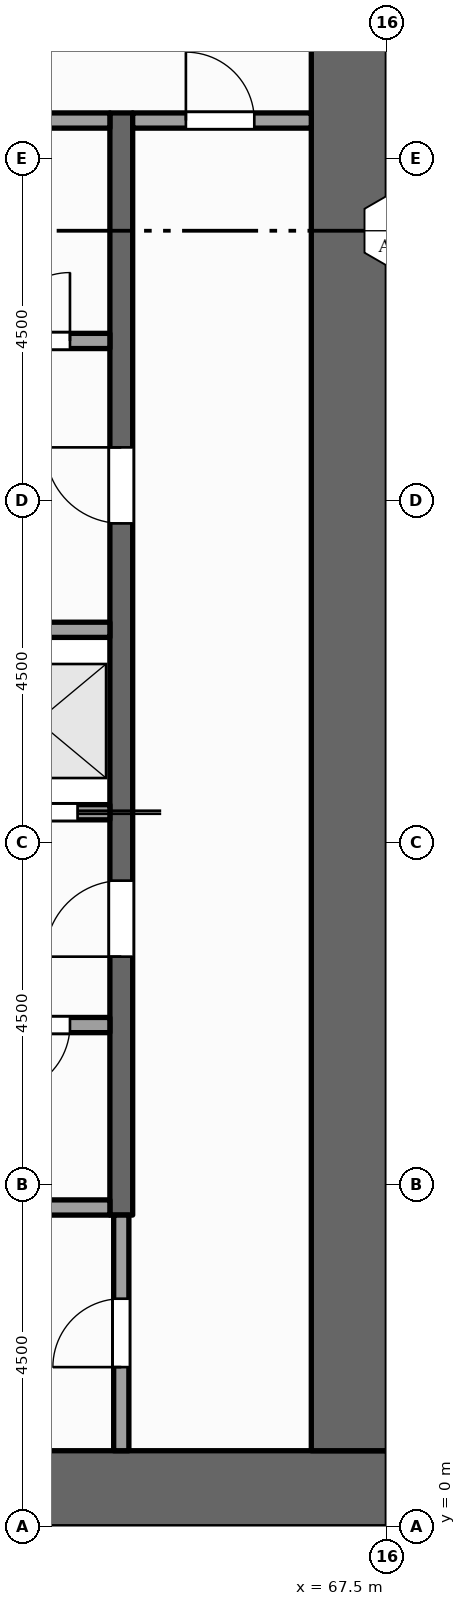
"""IFC4 building model, lengths in metres.
Left out: names, types, materials, properties, quantities, classifications, styles, units other than length and angle.
Written with IfcOpenShell. Run it as: python <this file> out.ifc"""

import sys

from ifc_helpers import new_model, si_unit, direction, frame, frame_2d, origin, place, context, subcontext, project, spatial, rectangle, extrude, element, fill, save


model = new_model("IFC4")
c1 = context("Model", 3, precision=1e-05, world=origin(), true_north=direction((0.0, 1.0)))
c2 = subcontext(c1, "Body", "Model", "MODEL_VIEW")
j1 = project(units=[si_unit("LENGTHUNIT", "METRE"), si_unit("PLANEANGLEUNIT", "RADIAN")], contexts=[c1])
p1 = place(None, origin())
s1 = spatial("IfcSite", under=j1, at=p1, CompositionType="ELEMENT")
p2 = place(p1, origin())
s2 = spatial("IfcBuilding", under=s1, at=p2, CompositionType="ELEMENT")
p3 = place(p2, frame((0.0, 0.0, 159.0)))
s3 = spatial("IfcBuildingStorey", under=s2, at=p3, CompositionType="ELEMENT", Elevation=159.0)
p4 = place(p3, frame((67.5, 0.5, -0.15), z_axis=(0.0, 0.0, 1.0), x_axis=(-1.0, 0.0, 0.0)))
e1 = element("IfcWall", 1, at=p4, inside=s3, PredefinedType="SHEAR", context=c2, shape_type="SweptSolid", body=[
    extrude(rectangle(XDim=13.5, YDim=1.0, at=frame_2d((6.75, 0.0))), origin(), (0.0, 0.0, 1.0), 4.0),
])
p5 = place(p3, frame((67.0, 1.0, -0.15), z_axis=(0.0, 0.0, 1.0), x_axis=(0.0, 1.0, 0.0)))
e2 = element("IfcWall", 2, at=p5, inside=s3, PredefinedType="SHEAR", context=c2, shape_type="SweptSolid", body=[
    extrude(rectangle(XDim=20.5, YDim=1.0, at=frame_2d((10.25, 0.0))), origin(), (0.0, 0.0, 1.0), 4.0),
])
p6 = place(p3, frame((64.0, 1.0, 0.0), z_axis=(0.0, 0.0, 1.0), x_axis=(0.0, 1.0, 0.0)))
e3 = element("IfcWall", 3, at=p6, inside=s3, PredefinedType="PARTITIONING", context=c2, shape_type="SweptSolid", body=[
    extrude(rectangle(XDim=3.1, YDim=0.2, at=frame_2d((1.55, 0.0))), origin(), (0.0, 0.0, 1.0), 3.85),
])
p7 = place(p6, frame((1.1, 0.0, 0.0)))
e4 = element("IfcOpeningElement", 4, at=p7, cuts=e3, PredefinedType="OPENING", context=c2, shape_type="SweptSolid", body=[
    extrude(rectangle(XDim=0.9, YDim=2.1, at=frame_2d((0.45, 1.05))), frame((0.0, 0.11, 0.0), z_axis=(0.0, -1.0, 0.0), x_axis=(1.0, 0.0, 0.0)), (0.0, 0.0, 1.0), 0.22),
])
p8 = place(p3, frame((64.0, 4.1, 0.0), z_axis=(0.0, 0.0, 1.0), x_axis=(0.0, 1.0, 0.0)))
e5 = element("IfcWall", 5, at=p8, inside=s3, PredefinedType="SHEAR", context=c2, shape_type="SweptSolid", body=[
    extrude(rectangle(XDim=14.5, YDim=0.3, at=frame_2d((7.25, 0.0))), origin(), (0.0, 0.0, 1.0), 3.85),
])
p9 = place(p8, frame((3.4, 0.0, 0.0)))
e6 = element("IfcOpeningElement", 6, at=p9, cuts=e5, PredefinedType="OPENING", context=c2, shape_type="SweptSolid", body=[
    extrude(rectangle(XDim=1.0, YDim=2.1, at=frame_2d((0.5, 1.05))), frame((0.0, 0.16, 0.0), z_axis=(0.0, -1.0, 0.0), x_axis=(1.0, 0.0, 0.0)), (0.0, 0.0, 1.0), 0.32),
])
p10 = place(p8, frame((9.1, 0.0, 0.0)))
e7 = element("IfcOpeningElement", 7, at=p10, cuts=e5, PredefinedType="OPENING", context=c2, shape_type="SweptSolid", body=[
    extrude(rectangle(XDim=1.0, YDim=2.1, at=frame_2d((0.5, 1.05))), frame((0.0, 0.16, 0.0), z_axis=(0.0, -1.0, 0.0), x_axis=(1.0, 0.0, 0.0)), (0.0, 0.0, 1.0), 0.32),
])
p11 = place(p3, frame((61.9, 4.2, 0.0), z_axis=(0.0, 0.0, 1.0), x_axis=(1.0, 0.0, 0.0)))
e8 = element("IfcWall", 8, at=p11, inside=s3, PredefinedType="PARTITIONING", context=c2, shape_type="SweptSolid", body=[
    extrude(rectangle(XDim=1.95, YDim=0.2, at=frame_2d((0.975, 0.0))), origin(), (0.0, 0.0, 1.0), 3.85),
])
p12 = place(p3, frame((61.9, 6.6, 0.0), z_axis=(0.0, 0.0, 1.0), x_axis=(1.0, 0.0, 0.0)))
e9 = element("IfcWall", 9, at=p12, inside=s3, PredefinedType="PARTITIONING", context=c2, shape_type="SweptSolid", body=[
    extrude(rectangle(XDim=1.95, YDim=0.2, at=frame_2d((0.975, 0.0))), origin(), (0.0, 0.0, 1.0), 3.85),
])
p13 = place(p12, frame((0.525, 0.0, 0.0)))
e10 = element("IfcOpeningElement", 10, at=p13, cuts=e9, PredefinedType="OPENING", context=c2, shape_type="SweptSolid", body=[
    extrude(rectangle(XDim=0.9, YDim=2.1, at=frame_2d((0.45, 1.05))), frame((0.0, 0.11, 0.0), z_axis=(0.0, -1.0, 0.0), x_axis=(1.0, 0.0, 0.0)), (0.0, 0.0, 1.0), 0.22),
])
p14 = place(p3, frame((61.9, 9.4, 0.0), z_axis=(0.0, 0.0, 1.0), x_axis=(1.0, 0.0, 0.0)))
e11 = element("IfcWall", 11, at=p14, inside=s3, PredefinedType="SOLIDWALL", context=c2, shape_type="SweptSolid", body=[
    extrude(rectangle(XDim=1.95, YDim=0.2, at=frame_2d((0.975, 0.0))), origin(), (0.0, 0.0, 1.0), 3.85),
])
p15 = place(p14, frame((0.425, 0.0, 0.012)))
e12 = element("IfcOpeningElement", 12, at=p15, cuts=e11, PredefinedType="OPENING", context=c2, shape_type="SweptSolid", body=[
    extrude(rectangle(XDim=1.1, YDim=2.1, at=frame_2d((0.55, 1.05))), frame((0.0, 0.11, 0.0), z_axis=(0.0, -1.0, 0.0), x_axis=(1.0, 0.0, 0.0)), (0.0, 0.0, 1.0), 0.22),
])
p16 = place(p3, frame((61.9, 11.8, 0.0), z_axis=(0.0, 0.0, 1.0), x_axis=(1.0, 0.0, 0.0)))
e13 = element("IfcWall", 13, at=p16, inside=s3, PredefinedType="SOLIDWALL", context=c2, shape_type="SweptSolid", body=[
    extrude(rectangle(XDim=1.95, YDim=0.2, at=frame_2d((0.975, 0.0))), origin(), (0.0, 0.0, 1.0), 3.85),
])
p17 = place(p3, frame((61.9, 15.6, 0.0), z_axis=(0.0, 0.0, 1.0), x_axis=(1.0, 0.0, 0.0)))
e14 = element("IfcWall", 14, at=p17, inside=s3, PredefinedType="PARTITIONING", context=c2, shape_type="SweptSolid", body=[
    extrude(rectangle(XDim=1.95, YDim=0.2, at=frame_2d((0.975, 0.0))), origin(), (0.0, 0.0, 1.0), 3.85),
])
p18 = place(p17, frame((0.525, 0.0, 0.0)))
e15 = element("IfcOpeningElement", 15, at=p18, cuts=e14, PredefinedType="OPENING", context=c2, shape_type="SweptSolid", body=[
    extrude(rectangle(XDim=0.9, YDim=2.1, at=frame_2d((0.45, 1.05))), frame((0.0, 0.11, 0.0), z_axis=(0.0, -1.0, 0.0), x_axis=(1.0, 0.0, 0.0)), (0.0, 0.0, 1.0), 0.22),
])
p19 = place(p3, frame((61.9, 18.5, 0.0), z_axis=(0.0, 0.0, 1.0), x_axis=(1.0, 0.0, 0.0)))
e16 = element("IfcWall", 16, at=p19, inside=s3, PredefinedType="PARTITIONING", context=c2, shape_type="SweptSolid", body=[
    extrude(rectangle(XDim=1.95, YDim=0.2, at=frame_2d((0.975, 0.0))), origin(), (0.0, 0.0, 1.0), 3.85),
])
p20 = place(p3, frame((64.15, 18.5, 0.0), z_axis=(0.0, 0.0, 1.0), x_axis=(1.0, 0.0, 0.0)))
e17 = element("IfcWall", 17, at=p20, inside=s3, PredefinedType="PARTITIONING", context=c2, shape_type="SweptSolid", body=[
    extrude(rectangle(XDim=2.35, YDim=0.2, at=frame_2d((1.175, 0.0))), origin(), (0.0, 0.0, 1.0), 3.85),
])
p21 = place(p20, frame((0.7, 0.0, 0.0)))
e18 = element("IfcOpeningElement", 18, at=p21, cuts=e17, PredefinedType="OPENING", context=c2, shape_type="SweptSolid", body=[
    extrude(rectangle(XDim=0.9, YDim=2.1, at=frame_2d((0.45, 1.05))), frame((0.0, 0.11, 0.0), z_axis=(0.0, -1.0, 0.0), x_axis=(1.0, 0.0, 0.0)), (0.0, 0.0, 1.0), 0.22),
])
p22 = place(p15, origin())
e19 = element("IfcDoor", 19, at=p22, inside=s3, OperationType="SLIDING_TO_RIGHT", PredefinedType="DOOR", context=c2, shape_type="SweptSolid", body=[
    extrude(rectangle(XDim=1.1, YDim=2.1, at=frame_2d((0.55, 1.05))), frame((0.0, 0.025, 0.0), z_axis=(0.0, -1.0, 0.0), x_axis=(1.0, 0.0, 0.0)), (0.0, 0.0, 1.0), 0.05),
])
fill(e12, e19)
p23 = place(p9, origin())
e20 = element("IfcDoor", 20, at=p23, inside=s3, OperationType="SINGLE_SWING_LEFT", PredefinedType="DOOR", context=c2, shape_type="SweptSolid", body=[
    extrude(rectangle(XDim=1.0, YDim=2.1, at=frame_2d((0.5, 1.05))), frame((0.0, 0.025, 0.0), z_axis=(0.0, -1.0, 0.0), x_axis=(1.0, 0.0, 0.0)), (0.0, 0.0, 1.0), 0.05),
])
fill(e6, e20)
p24 = place(p10, origin())
e21 = element("IfcDoor", 21, at=p24, inside=s3, OperationType="SINGLE_SWING_RIGHT", PredefinedType="DOOR", context=c2, shape_type="SweptSolid", body=[
    extrude(rectangle(XDim=1.0, YDim=2.1, at=frame_2d((0.5, 1.05))), frame((0.0, 0.025, 0.0), z_axis=(0.0, -1.0, 0.0), x_axis=(1.0, 0.0, 0.0)), (0.0, 0.0, 1.0), 0.05),
])
fill(e7, e21)
p25 = place(p7, origin())
e22 = element("IfcDoor", 22, at=p25, inside=s3, OperationType="SINGLE_SWING_LEFT", PredefinedType="DOOR", context=c2, shape_type="SweptSolid", body=[
    extrude(rectangle(XDim=0.9, YDim=2.1, at=frame_2d((0.45, 1.05))), frame((0.0, 0.025, 0.0), z_axis=(0.0, -1.0, 0.0), x_axis=(1.0, 0.0, 0.0)), (0.0, 0.0, 1.0), 0.05),
])
fill(e4, e22)
p26 = place(p21, origin())
e23 = element("IfcDoor", 23, at=p26, inside=s3, OperationType="SINGLE_SWING_LEFT", PredefinedType="DOOR", context=c2, shape_type="SweptSolid", body=[
    extrude(rectangle(XDim=0.9, YDim=2.1, at=frame_2d((0.45, 1.05))), frame((0.0, 0.025, 0.0), z_axis=(0.0, -1.0, 0.0), x_axis=(1.0, 0.0, 0.0)), (0.0, 0.0, 1.0), 0.05),
])
fill(e18, e23)
p27 = place(p13, origin())
e24 = element("IfcDoor", 24, at=p27, inside=s3, OperationType="SINGLE_SWING_LEFT", PredefinedType="DOOR", context=c2, shape_type="SweptSolid", body=[
    extrude(rectangle(XDim=0.9, YDim=2.1, at=frame_2d((0.45, 1.05))), frame((0.0, 0.025, 0.0), z_axis=(0.0, -1.0, 0.0), x_axis=(1.0, 0.0, 0.0)), (0.0, 0.0, 1.0), 0.05),
])
fill(e10, e24)
p28 = place(p18, origin())
e25 = element("IfcDoor", 25, at=p28, inside=s3, OperationType="SINGLE_SWING_RIGHT", PredefinedType="DOOR", context=c2, shape_type="SweptSolid", body=[
    extrude(rectangle(XDim=0.9, YDim=2.1, at=frame_2d((0.45, 1.05))), frame((0.0, 0.025, 0.0), z_axis=(0.0, -1.0, 0.0), x_axis=(1.0, 0.0, 0.0)), (0.0, 0.0, 1.0), 0.05),
])
fill(e15, e25)
save(model, sys.argv[1])
